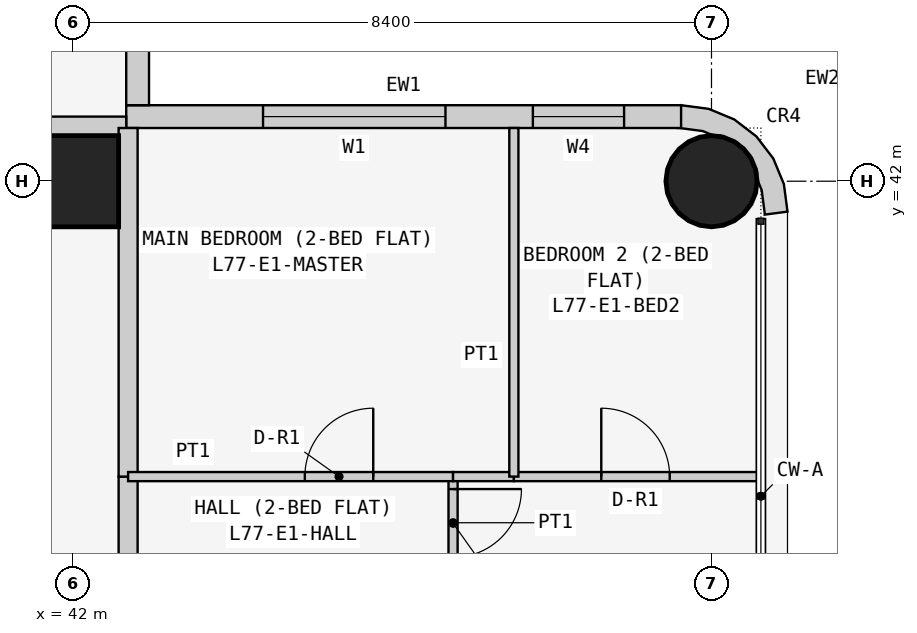
"""IFC4 building model, lengths in metres.
Left out: names, types, materials, properties, quantities, classifications, styles, units other than length and angle.
Written with IfcOpenShell. Run it as: python <this file> out.ifc"""

import sys

from ifc_helpers import new_model, si_unit, direction, frame, frame_2d, origin, origin_2d, place, context, subcontext, project, spatial, polyline, rectangle, circle, outline, extrude, element, fill, save


model = new_model("IFC4")
c1 = context("Model", 3, precision=1e-05, world=origin(), true_north=direction((0.0, 1.0)))
c2 = subcontext(c1, "Body", "Model", "MODEL_VIEW")
j1 = project(units=[si_unit("LENGTHUNIT", "METRE"), si_unit("PLANEANGLEUNIT", "RADIAN")], contexts=[c1])
p1 = place(None, origin())
s1 = spatial("IfcSite", under=j1, at=p1, CompositionType="ELEMENT")
p2 = place(p1, origin())
s2 = spatial("IfcBuilding", under=s1, at=p2, CompositionType="ELEMENT")
p3 = place(p2, frame((0.0, 0.0, 293.7)))
s3 = spatial("IfcBuildingStorey", under=s2, at=p3, CompositionType="ELEMENT", Elevation=293.7)
p4 = place(p3, frame((42.0, 42.0, 0.0), z_axis=(0.0, 0.0, 1.0), x_axis=(1.0, 0.0, 0.0)))
e1 = element("IfcColumn", 1, at=p4, inside=s3, PredefinedType="COLUMN", context=c2, shape_type="SweptSolid", body=[
    extrude(rectangle(XDim=1.2, YDim=1.2, at=origin_2d()), origin(), (0.0, 0.0, 1.0), 3.6),
])
p5 = place(p3, frame((50.4, 42.0, 0.0), z_axis=(0.0, 0.0, 1.0), x_axis=(1.0, 0.0, 0.0)))
e2 = element("IfcColumn", 2, at=p5, inside=s3, PredefinedType="COLUMN", context=c2, shape_type="SweptSolid", body=[
    extrude(circle(Radius=0.6, at=origin_2d()), origin(), (0.0, 0.0, 1.0), 3.6),
])
p6 = place(p3, frame((50.0, 42.85, 0.0), z_axis=(0.0, 0.0, 1.0), x_axis=(-1.0, 0.0, 0.0)))
e3 = element("IfcWall", 3, at=p6, inside=s3, PredefinedType="SOLIDWALL", context=c2, shape_type="SweptSolid", body=[
    extrude(rectangle(XDim=7.3, YDim=0.3, at=frame_2d((3.65, 0.0))), origin(), (0.0, 0.0, 1.0), 3.45),
])
p7 = place(p6, frame((3.1, 0.0, 0.9)))
e4 = element("IfcOpeningElement", 4, at=p7, cuts=e3, PredefinedType="OPENING", context=c2, shape_type="SweptSolid", body=[
    extrude(rectangle(XDim=2.4, YDim=1.5, at=frame_2d((1.2, 0.75))), frame((0.0, 0.16, 0.0), z_axis=(0.0, -1.0, 0.0), x_axis=(1.0, 0.0, 0.0)), (0.0, 0.0, 1.0), 0.32),
])
p8 = place(p6, frame((0.75, 0.0, 0.9)))
e5 = element("IfcOpeningElement", 5, at=p8, cuts=e3, PredefinedType="OPENING", context=c2, shape_type="SweptSolid", body=[
    extrude(rectangle(XDim=1.2, YDim=1.5, at=frame_2d((0.6, 0.75))), frame((0.0, 0.16, 0.0), z_axis=(0.0, -1.0, 0.0), x_axis=(1.0, 0.0, 0.0)), (0.0, 0.0, 1.0), 0.32),
])
p9 = place(p3, frame((42.85, 43.0, 0.0), z_axis=(0.0, 0.0, 1.0), x_axis=(0.0, 1.0, 0.0)))
e6 = element("IfcWall", 6, at=p9, inside=s3, PredefinedType="SOLIDWALL", context=c2, shape_type="SweptSolid", body=[
    extrude(rectangle(XDim=7.0, YDim=0.3, at=frame_2d((3.5, 0.0))), origin(), (0.0, 0.0, 1.0), 3.45),
])
p10 = place(p9, frame((1.5, 0.0, 0.9)))
e7 = element("IfcOpeningElement", 7, at=p10, cuts=e6, PredefinedType="OPENING", context=c2, shape_type="SweptSolid", body=[
    extrude(rectangle(XDim=2.4, YDim=1.5, at=frame_2d((1.2, 0.75))), frame((0.0, 0.16, 0.0), z_axis=(0.0, -1.0, 0.0), x_axis=(1.0, 0.0, 0.0)), (0.0, 0.0, 1.0), 0.32),
])
p11 = place(p9, frame((5.05, 0.0, 0.9)))
e8 = element("IfcOpeningElement", 8, at=p11, cuts=e6, PredefinedType="OPENING", context=c2, shape_type="SweptSolid", body=[
    extrude(rectangle(XDim=1.2, YDim=1.5, at=frame_2d((0.6, 0.75))), frame((0.0, 0.16, 0.0), z_axis=(0.0, -1.0, 0.0), x_axis=(1.0, 0.0, 0.0)), (0.0, 0.0, 1.0), 0.32),
])
p12 = place(p3, frame((50.976, 41.638, 0.0), z_axis=(0.0, 0.0, 1.0), x_axis=(0.707106781187, 0.707106781187, 0.0)))
e9 = element("IfcWall", 9, at=p12, inside=s3, PredefinedType="SOLIDWALL", context=c2, shape_type="SweptSolid", body=[
    extrude(outline(polyline([(0.233, 0.114), (0.047, -0.129), (0.033, -0.143), (0.273, -0.327), (0.495, -0.037), (0.635, 0.301), (0.683, 0.663), (0.635, 1.025), (0.495, 1.363), (0.273, 1.653), (0.033, 1.469), (0.047, 1.455), (0.233, 1.212), (0.292, 1.069), (0.358, 1.003), (0.449, 0.782), (0.449, 0.543), (0.358, 0.322), (0.292, 0.257), (0.233, 0.114)])), origin(), (0.0, 0.0, 1.0), 3.45),
])
p13 = place(p3, frame((35.829, 42.725, 0.0), z_axis=(0.0, 0.0, 1.0), x_axis=(1.0, 0.0, 0.0)))
e10 = element("IfcWall", 10, at=p13, inside=s3, PredefinedType="PARTITIONING", context=c2, shape_type="SweptSolid", body=[
    extrude(rectangle(XDim=6.871, YDim=0.25, at=frame_2d((3.436, 0.0))), origin(), (0.0, 0.0, 1.0), 3.45),
])
p14 = place(p3, frame((42.725, 38.114, 0.0), z_axis=(0.0, 0.0, 1.0), x_axis=(0.0, -1.0, 0.0)))
e11 = element("IfcWall", 11, at=p14, inside=s3, PredefinedType="PARTITIONING", context=c2, shape_type="SweptSolid", body=[
    extrude(rectangle(XDim=1.214, YDim=0.25, at=frame_2d((0.607, 0.0))), origin(), (0.0, 0.0, 1.0), 3.45),
])
p15 = place(p3, frame((42.725, 42.7, 0.0), z_axis=(0.0, 0.0, 1.0), x_axis=(0.0, -1.0, 0.0)))
e12 = element("IfcWall", 12, at=p15, inside=s3, PredefinedType="PARTITIONING", context=c2, shape_type="SweptSolid", body=[
    extrude(rectangle(XDim=4.586, YDim=0.25, at=frame_2d((2.293, 0.0))), origin(), (0.0, 0.0, 1.0), 3.45),
])
p16 = place(p3, frame((47.0, 36.9, 0.0), z_axis=(0.0, 0.0, 1.0), x_axis=(0.0, 1.0, 0.0)))
e13 = element("IfcWall", 13, at=p16, inside=s3, PredefinedType="PARTITIONING", context=c2, shape_type="SweptSolid", body=[
    extrude(rectangle(XDim=1.214, YDim=0.12, at=frame_2d((0.607, 0.0))), origin(), (0.0, 0.0, 1.0), 3.45),
])
p17 = place(p16, frame((0.15, 0.0, 0.0)))
e14 = element("IfcOpeningElement", 14, at=p17, cuts=e13, PredefinedType="OPENING", context=c2, shape_type="SweptSolid", body=[
    extrude(rectangle(XDim=0.9, YDim=2.1, at=frame_2d((0.45, 1.05))), frame((0.0, 0.07, 0.0), z_axis=(0.0, -1.0, 0.0), x_axis=(1.0, 0.0, 0.0)), (0.0, 0.0, 1.0), 0.14),
])
p18 = place(p3, frame((47.0, 38.114, 0.0), z_axis=(0.0, 0.0, 1.0), x_axis=(-1.0, 0.0, 0.0)))
e15 = element("IfcWall", 15, at=p18, inside=s3, PredefinedType="PARTITIONING", context=c2, shape_type="SweptSolid", body=[
    extrude(rectangle(XDim=4.275, YDim=0.12, at=frame_2d((2.137, 0.0))), origin(), (0.0, 0.0, 1.0), 3.45),
])
p19 = place(p18, frame((1.05, 0.0, 0.0)))
e16 = element("IfcOpeningElement", 16, at=p19, cuts=e15, PredefinedType="OPENING", context=c2, shape_type="SweptSolid", body=[
    extrude(rectangle(XDim=0.9, YDim=2.1, at=frame_2d((0.45, 1.05))), frame((0.0, 0.07, 0.0), z_axis=(0.0, -1.0, 0.0), x_axis=(1.0, 0.0, 0.0)), (0.0, 0.0, 1.0), 0.14),
])
p20 = place(p3, frame((47.8, 38.114, 0.0), z_axis=(0.0, 0.0, 1.0), x_axis=(-1.0, 0.0, 0.0)))
e17 = element("IfcWall", 17, at=p20, inside=s3, PredefinedType="PARTITIONING", context=c2, shape_type="SweptSolid", body=[
    extrude(rectangle(XDim=0.8, YDim=0.12, at=frame_2d((0.4, 0.0))), origin(), (0.0, 0.0, 1.0), 3.45),
])
p21 = place(p3, frame((51.05, 38.114, 0.0), z_axis=(0.0, 0.0, 1.0), x_axis=(-1.0, 0.0, 0.0)))
e18 = element("IfcWall", 18, at=p21, inside=s3, PredefinedType="PARTITIONING", context=c2, shape_type="SweptSolid", body=[
    extrude(rectangle(XDim=3.25, YDim=0.12, at=frame_2d((1.625, 0.0))), origin(), (0.0, 0.0, 1.0), 3.45),
])
p22 = place(p21, frame((1.2, 0.0, 0.0)))
e19 = element("IfcOpeningElement", 19, at=p22, cuts=e18, PredefinedType="OPENING", context=c2, shape_type="SweptSolid", body=[
    extrude(rectangle(XDim=0.9, YDim=2.1, at=frame_2d((0.45, 1.05))), frame((0.0, 0.07, 0.0), z_axis=(0.0, -1.0, 0.0), x_axis=(1.0, 0.0, 0.0)), (0.0, 0.0, 1.0), 0.14),
])
p23 = place(p3, frame((47.8, 38.114, 0.0), z_axis=(0.0, 0.0, 1.0), x_axis=(0.0, 1.0, 0.0)))
e20 = element("IfcWall", 20, at=p23, inside=s3, PredefinedType="PARTITIONING", context=c2, shape_type="SweptSolid", body=[
    extrude(rectangle(XDim=4.586, YDim=0.12, at=frame_2d((2.293, 0.0))), origin(), (0.0, 0.0, 1.0), 3.45),
])
p24 = place(p7, origin())
e21 = element("IfcWindow", 21, at=p24, inside=s3, PartitioningType="SINGLE_PANEL", PredefinedType="WINDOW", context=c2, shape_type="SweptSolid", body=[
    extrude(rectangle(XDim=2.4, YDim=1.5, at=frame_2d((1.2, 0.75))), frame((0.0, 0.03, 0.0), z_axis=(0.0, -1.0, 0.0), x_axis=(1.0, 0.0, 0.0)), (0.0, 0.0, 1.0), 0.06),
])
fill(e4, e21)
p25 = place(p8, origin())
e22 = element("IfcWindow", 22, at=p25, inside=s3, PartitioningType="SINGLE_PANEL", PredefinedType="WINDOW", context=c2, shape_type="SweptSolid", body=[
    extrude(rectangle(XDim=1.2, YDim=1.5, at=frame_2d((0.6, 0.75))), frame((0.0, 0.03, 0.0), z_axis=(0.0, -1.0, 0.0), x_axis=(1.0, 0.0, 0.0)), (0.0, 0.0, 1.0), 0.06),
])
fill(e5, e22)
p26 = place(p17, frame((0.9, 0.0, 0.0), z_axis=(0.0, 0.0, 1.0), x_axis=(-1.0, 0.0, 0.0)))
e23 = element("IfcDoor", 23, at=p26, inside=s3, OperationType="SINGLE_SWING_LEFT", PredefinedType="DOOR", context=c2, shape_type="SweptSolid", body=[
    extrude(rectangle(XDim=0.9, YDim=2.1, at=frame_2d((0.45, 1.05))), frame((0.0, 0.025, 0.0), z_axis=(0.0, -1.0, 0.0), x_axis=(1.0, 0.0, 0.0)), (0.0, 0.0, 1.0), 0.05),
])
fill(e14, e23)
p27 = place(p19, frame((0.9, 0.0, 0.0), z_axis=(0.0, 0.0, 1.0), x_axis=(-1.0, 0.0, 0.0)))
e24 = element("IfcDoor", 24, at=p27, inside=s3, OperationType="SINGLE_SWING_RIGHT", PredefinedType="DOOR", context=c2, shape_type="SweptSolid", body=[
    extrude(rectangle(XDim=0.9, YDim=2.1, at=frame_2d((0.45, 1.05))), frame((0.0, 0.025, 0.0), z_axis=(0.0, -1.0, 0.0), x_axis=(1.0, 0.0, 0.0)), (0.0, 0.0, 1.0), 0.05),
])
fill(e16, e24)
p28 = place(p22, frame((0.9, 0.0, 0.0), z_axis=(0.0, 0.0, 1.0), x_axis=(-1.0, 0.0, 0.0)))
e25 = element("IfcDoor", 25, at=p28, inside=s3, OperationType="SINGLE_SWING_LEFT", PredefinedType="DOOR", context=c2, shape_type="SweptSolid", body=[
    extrude(rectangle(XDim=0.9, YDim=2.1, at=frame_2d((0.45, 1.05))), frame((0.0, 0.025, 0.0), z_axis=(0.0, -1.0, 0.0), x_axis=(1.0, 0.0, 0.0)), (0.0, 0.0, 1.0), 0.05),
])
fill(e19, e25)
save(model, sys.argv[1])
